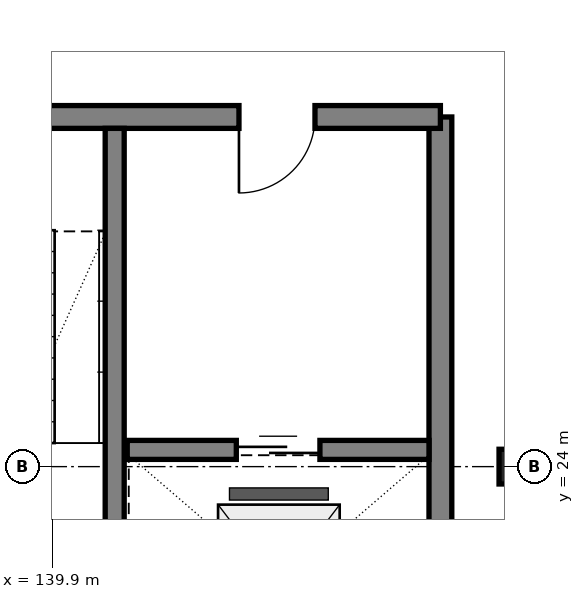
"""IFC4 building model, lengths in metres.
Left out: names, types, materials, properties, quantities, classifications, styles, units other than length and angle.
Written with IfcOpenShell. Run it as: python <this file> out.ifc"""

import sys

from ifc_helpers import new_model, si_unit, direction, frame, frame_2d, origin, origin_2d_with_axis, place, context, subcontext, project, spatial, rectangle, hollow_circle, extrude, element, fill, save


model = new_model("IFC4")
c1 = context("Model", 3, precision=1e-05, world=origin(), true_north=direction((0.0, 1.0)))
c2 = subcontext(c1, "Body", "Model", "MODEL_VIEW")
j1 = project(units=[si_unit("LENGTHUNIT", "METRE"), si_unit("PLANEANGLEUNIT", "RADIAN")], contexts=[c1])
p1 = place(None, origin())
s1 = spatial("IfcSite", under=j1, at=p1, CompositionType="ELEMENT")
p2 = place(p1, origin())
s2 = spatial("IfcBuilding", under=s1, at=p2, CompositionType="ELEMENT")
p3 = place(p2, frame((0.0, 0.0, 4.5)))
s3 = spatial("IfcBuildingStorey", under=s2, at=p3, CompositionType="ELEMENT", Elevation=4.5)
p4 = place(p3, frame((146.0, 24.0, 0.0), z_axis=(0.0, 0.0, 1.0), x_axis=(1.0, 0.0, 0.0)))
e1 = element("IfcColumn", 1, at=p4, inside=s3, PredefinedType="COLUMN", context=c2, shape_type="SweptSolid", body=[
    extrude(hollow_circle(Radius=0.229, WallThickness=0.013, at=origin_2d_with_axis()), origin(), (0.0, 0.0, 1.0), 3.9),
])
p5 = place(p3, frame((145.0, 20.6, 0.0), z_axis=(0.0, 0.0, 1.0), x_axis=(0.0, 1.0, 0.0)))
e2 = element("IfcWall", 2, at=p5, inside=s3, PredefinedType="SHEAR", context=c2, shape_type="SweptSolid", body=[
    extrude(rectangle(XDim=8.0, YDim=0.3, at=frame_2d((4.0, 0.0), x_axis=(1.0, 0.0))), origin(), (0.0, 0.0, 1.0), 3.9),
])
p6 = place(p3, frame((145.0, 28.6, 0.0), z_axis=(0.0, 0.0, 1.0), x_axis=(-1.0, 0.0, 0.0)))
e3 = element("IfcWall", 3, at=p6, inside=s3, PredefinedType="SHEAR", context=c2, shape_type="SweptSolid", body=[
    extrude(rectangle(XDim=7.4, YDim=0.3, at=frame_2d((3.7, 0.0), x_axis=(1.0, 0.0))), origin(), (0.0, 0.0, 1.0), 3.9),
])
p7 = place(p6, frame((1.65, 0.0, 0.0)))
e4 = element("IfcOpeningElement", 4, at=p7, cuts=e3, PredefinedType="OPENING", context=c2, shape_type="SweptSolid", body=[
    extrude(rectangle(XDim=1.0, YDim=2.15, at=frame_2d((0.5, 1.075), x_axis=(1.0, 0.0))), frame((0.0, 0.16, 0.0), z_axis=(0.0, -1.0, 0.0), x_axis=(1.0, 0.0, 0.0)), (0.0, 0.0, 1.0), 0.32),
])
p8 = place(p6, frame((5.3, 0.0, 0.0)))
e5 = element("IfcOpeningElement", 5, at=p8, cuts=e3, PredefinedType="OPENING", context=c2, shape_type="SweptSolid", body=[
    extrude(rectangle(XDim=1.0, YDim=2.15, at=frame_2d((0.5, 1.075), x_axis=(1.0, 0.0))), frame((0.0, 0.16, 0.0), z_axis=(0.0, -1.0, 0.0), x_axis=(1.0, 0.0, 0.0)), (0.0, 0.0, 1.0), 0.32),
])
p9 = place(p3, frame((140.715, 20.75, 0.0), z_axis=(0.0, 0.0, 1.0), x_axis=(0.0, 1.0, 0.0)))
e6 = element("IfcWall", 6, at=p9, inside=s3, PredefinedType="SHEAR", context=c2, shape_type="SweptSolid", body=[
    extrude(rectangle(XDim=7.7, YDim=0.25, at=frame_2d((3.85, 0.0), x_axis=(1.0, 0.0))), origin(), (0.0, 0.0, 1.0), 3.9),
])
p10 = place(p3, frame((140.88, 24.22, 0.0), z_axis=(0.0, 0.0, 1.0), x_axis=(1.0, 0.0, 0.0)))
e7 = element("IfcWall", 7, at=p10, inside=s3, PredefinedType="SHEAR", context=c2, shape_type="SweptSolid", body=[
    extrude(rectangle(XDim=3.97, YDim=0.25, at=frame_2d((1.985, 0.0), x_axis=(1.0, 0.0))), origin(), (0.0, 0.0, 1.0), 3.65),
])
p11 = place(p10, frame((1.435, 0.0, 0.0)))
e8 = element("IfcOpeningElement", 8, at=p11, cuts=e7, PredefinedType="OPENING", context=c2, shape_type="SweptSolid", body=[
    extrude(rectangle(XDim=1.1, YDim=2.15, at=frame_2d((0.55, 1.075), x_axis=(1.0, 0.0))), frame((0.0, 0.135, 0.0), z_axis=(0.0, -1.0, 0.0), x_axis=(1.0, 0.0, 0.0)), (0.0, 0.0, 1.0), 0.27),
])
p12 = place(p7, origin())
e9 = element("IfcDoor", 9, at=p12, inside=s3, OperationType="SINGLE_SWING_RIGHT", PredefinedType="DOOR", context=c2, shape_type="SweptSolid", body=[
    extrude(rectangle(XDim=1.0, YDim=2.15, at=frame_2d((0.5, 1.075), x_axis=(1.0, 0.0))), frame((0.0, 0.025, 0.0), z_axis=(0.0, -1.0, 0.0), x_axis=(1.0, 0.0, 0.0)), (0.0, 0.0, 1.0), 0.05),
])
fill(e4, e9)
p13 = place(p11, origin())
e10 = element("IfcDoor", 10, at=p13, inside=s3, OperationType="SLIDING_TO_LEFT", PredefinedType="DOOR", context=c2, shape_type="SweptSolid", body=[
    extrude(rectangle(XDim=1.1, YDim=2.15, at=frame_2d((0.55, 1.075), x_axis=(1.0, 0.0))), frame((0.0, 0.025, 0.0), z_axis=(0.0, -1.0, 0.0), x_axis=(1.0, 0.0, 0.0)), (0.0, 0.0, 1.0), 0.05),
])
fill(e8, e10)
save(model, sys.argv[1])
